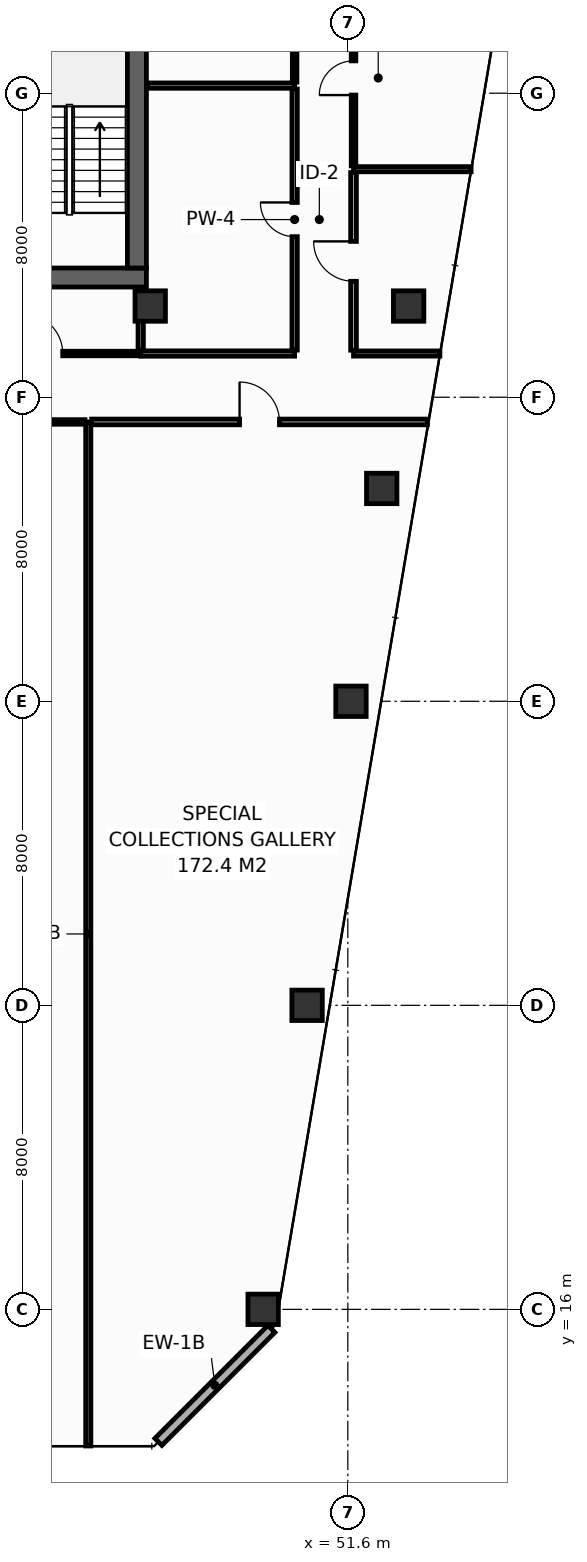
"""IFC4 building model, lengths in metres.
Left out: names, types, materials, properties, quantities, classifications, styles, units other than length and angle.
Written with IfcOpenShell. Run it as: python <this file> out.ifc"""

import sys

from ifc_helpers import new_model, si_unit, direction, frame, frame_2d, origin, origin_2d, place, context, subcontext, project, spatial, rectangle, hollow_rectangle, extrude, element, fill, save


model = new_model("IFC4")
c1 = context("Model", 3, precision=1e-05, world=origin(), true_north=direction((0.0, 1.0)))
c2 = subcontext(c1, "Body", "Model", "MODEL_VIEW")
j1 = project(units=[si_unit("LENGTHUNIT", "METRE"), si_unit("PLANEANGLEUNIT", "RADIAN")], contexts=[c1])
p1 = place(None, origin())
s1 = spatial("IfcSite", under=j1, at=p1, CompositionType="ELEMENT")
p2 = place(p1, origin())
s2 = spatial("IfcBuilding", under=s1, at=p2, CompositionType="ELEMENT")
p3 = place(p2, frame((0.0, 0.0, 198.0)))
s3 = spatial("IfcBuildingStorey", under=s2, at=p3, CompositionType="ELEMENT", Elevation=198.0)
p4 = place(p3, frame((13.6, 43.15, 0.0), z_axis=(0.0, 0.0, 1.0), x_axis=(1.0, 0.0, 0.0)))
e1 = element("IfcWall", 1, at=p4, inside=s3, PredefinedType="SHEAR", context=c2, shape_type="SweptSolid", body=[
    extrude(rectangle(XDim=32.7, YDim=0.5, at=frame_2d((16.35, 0.0))), origin(), (0.0, 0.0, 1.0), 3.55),
])
p5 = place(p4, frame((5.4, 0.0, 0.0)))
e2 = element("IfcOpeningElement", 2, at=p5, cuts=e1, PredefinedType="OPENING", context=c2, shape_type="SweptSolid", body=[
    extrude(rectangle(XDim=1.1, YDim=2.15, at=frame_2d((0.55, 1.075))), frame((0.0, 0.26, 0.0), z_axis=(0.0, -1.0, 0.0), x_axis=(1.0, 0.0, 0.0)), (0.0, 0.0, 1.0), 0.52),
])
p6 = place(p4, frame((25.6, 0.0, 0.0)))
e3 = element("IfcOpeningElement", 3, at=p6, cuts=e1, PredefinedType="OPENING", context=c2, shape_type="SweptSolid", body=[
    extrude(rectangle(XDim=1.1, YDim=2.15, at=frame_2d((0.55, 1.075))), frame((0.0, 0.26, 0.0), z_axis=(0.0, -1.0, 0.0), x_axis=(1.0, 0.0, 0.0)), (0.0, 0.0, 1.0), 0.52),
])
p7 = place(p3, frame((46.05, 43.4, 0.0), z_axis=(0.0, 0.0, 1.0), x_axis=(0.0, 1.0, 0.0)))
e4 = element("IfcWall", 4, at=p7, inside=s3, PredefinedType="SHEAR", context=c2, shape_type="SweptSolid", body=[
    extrude(rectangle(XDim=10.4, YDim=0.5, at=frame_2d((5.2, 0.0))), origin(), (0.0, 0.0, 1.0), 3.55),
])
for number, where, z_axis, x_axis in (
    (5, (46.4, 42.4, 0.0), (0.0, 0.0, 1.0), (1.0, 0.0, 0.0)),
    (6, (53.2, 42.4, 0.0), (0.0, 0.0, 1.0), (1.0, 0.0, 0.0)),
    (7, (49.372, 16.0, 0.0), (0.0, 0.0, 1.0), (1.0, 0.0, 0.0)),
    (8, (50.528, 24.0, 0.0), (0.0, 0.0, 1.0), (1.0, 0.0, 0.0)),
    (9, (51.683, 32.0, 0.0), (0.0, 0.0, 1.0), (1.0, 0.0, 0.0)),
    (10, (52.492, 37.6, 0.0), (0.0, 0.0, 1.0), (1.0, 0.0, 0.0)),
):
    element("IfcColumn", number, at=place(p3, frame(where, z_axis=z_axis, x_axis=x_axis)), inside=s3, PredefinedType="COLUMN", context=c2, shape_type="SweptSolid", body=[
        extrude(hollow_rectangle(XDim=0.8, YDim=0.8, WallThickness=0.036, at=origin_2d()), origin(), (0.0, 0.0, 1.0), 3.8),
    ])
p8 = place(p3, frame((46.615, 12.513, 0.0), z_axis=(0.0, 0.0, 1.0), x_axis=(0.707135806771, 0.70707775441, 0.0)))
e11 = element("IfcWall", 11, at=p8, inside=s3, PredefinedType="STANDARD", context=c2, shape_type="SweptSolid", body=[
    extrude(rectangle(XDim=4.206, YDim=0.26, at=frame_2d((2.103, 0.0))), origin(), (0.0, 0.0, 1.0), 3.55),
])
p9 = place(p3, frame((46.15, 41.15, 0.0), z_axis=(0.0, 0.0, 1.0), x_axis=(1.0, 0.0, 0.0)))
e12 = element("IfcWall", 12, at=p9, inside=s3, PredefinedType="PARTITIONING", context=c2, shape_type="SweptSolid", body=[
    extrude(rectangle(XDim=4.05, YDim=0.14, at=frame_2d((2.025, 0.0))), origin(), (0.0, 0.0, 1.0), 3.55),
])
p10 = place(p3, frame((46.15, 41.24, 0.0), z_axis=(0.0, 0.0, 1.0), x_axis=(0.0, 1.0, 0.0)))
e13 = element("IfcWall", 13, at=p10, inside=s3, PredefinedType="PARTITIONING", context=c2, shape_type="SweptSolid", body=[
    extrude(rectangle(XDim=1.64, YDim=0.14, at=frame_2d((0.82, 0.0))), origin(), (0.0, 0.0, 1.0), 3.55),
])
p11 = place(p3, frame((46.32, 48.2, 0.0), z_axis=(0.0, 0.0, 1.0), x_axis=(1.0, 0.0, 0.0)))
e14 = element("IfcWall", 14, at=p11, inside=s3, PredefinedType="PARTITIONING", context=c2, shape_type="SweptSolid", body=[
    extrude(rectangle(XDim=3.88, YDim=0.14, at=frame_2d((1.94, 0.0))), origin(), (0.0, 0.0, 1.0), 3.55),
])
p12 = place(p3, frame((50.2, 41.24, 0.0), z_axis=(0.0, 0.0, 1.0), x_axis=(0.0, 1.0, 0.0)))
e15 = element("IfcWall", 15, at=p12, inside=s3, PredefinedType="PARTITIONING", context=c2, shape_type="SweptSolid", body=[
    extrude(rectangle(XDim=6.87, YDim=0.14, at=frame_2d((3.435, 0.0))), origin(), (0.0, 0.0, 1.0), 2.835),
])
p13 = place(p12, frame((2.985, 0.0, 0.0)))
e16 = element("IfcOpeningElement", 16, at=p13, cuts=e15, PredefinedType="OPENING", context=c2, shape_type="SweptSolid", body=[
    extrude(rectangle(XDim=0.9, YDim=2.1, at=frame_2d((0.45, 1.05))), frame((0.0, 0.08, 0.0), z_axis=(0.0, -1.0, 0.0), x_axis=(1.0, 0.0, 0.0)), (0.0, 0.0, 1.0), 0.16),
])
p14 = place(p3, frame((50.2, 48.29, 0.0), z_axis=(0.0, 0.0, 1.0), x_axis=(0.0, 1.0, 0.0)))
e17 = element("IfcWall", 17, at=p14, inside=s3, PredefinedType="PARTITIONING", context=c2, shape_type="SweptSolid", body=[
    extrude(rectangle(XDim=3.98, YDim=0.12, at=frame_2d((1.99, 0.0))), origin(), (0.0, 0.0, 1.0), 3.55),
])
p15 = place(p14, frame((1.465, 0.0, 0.0)))
e18 = element("IfcOpeningElement", 18, at=p15, cuts=e17, PredefinedType="OPENING", context=c2, shape_type="SweptSolid", body=[
    extrude(rectangle(XDim=1.05, YDim=2.15, at=frame_2d((0.525, 1.075))), frame((0.0, 0.07, 0.0), z_axis=(0.0, -1.0, 0.0), x_axis=(1.0, 0.0, 0.0)), (0.0, 0.0, 1.0), 0.14),
])
p16 = place(p3, frame((51.75, 41.15, 0.0), z_axis=(0.0, 0.0, 1.0), x_axis=(1.0, 0.0, 0.0)))
e19 = element("IfcWall", 19, at=p16, inside=s3, PredefinedType="PARTITIONING", context=c2, shape_type="SweptSolid", body=[
    extrude(rectangle(XDim=2.273, YDim=0.135, at=frame_2d((1.136, 0.0))), origin(), (0.0, 0.0, 1.0), 3.035),
])
p17 = place(p3, frame((51.75, 46.0, 0.0), z_axis=(0.0, 0.0, 1.0), x_axis=(1.0, 0.0, 0.0)))
e20 = element("IfcWall", 20, at=p17, inside=s3, PredefinedType="PARTITIONING", context=c2, shape_type="SweptSolid", body=[
    extrude(rectangle(XDim=3.094, YDim=0.135, at=frame_2d((1.547, 0.0))), origin(), (0.0, 0.0, 1.0), 2.835),
])
p18 = place(p3, frame((51.75, 41.238, 0.0), z_axis=(0.0, 0.0, 1.0), x_axis=(0.0, 1.0, 0.0)))
e21 = element("IfcWall", 21, at=p18, inside=s3, PredefinedType="PARTITIONING", context=c2, shape_type="SweptSolid", body=[
    extrude(rectangle(XDim=4.675, YDim=0.15, at=frame_2d((2.337, 0.0))), origin(), (0.0, 0.0, 1.0), 2.835),
])
p19 = place(p18, frame((1.813, 0.0, 0.0)))
e22 = element("IfcOpeningElement", 22, at=p19, cuts=e21, PredefinedType="OPENING", context=c2, shape_type="SweptSolid", body=[
    extrude(rectangle(XDim=1.05, YDim=2.15, at=frame_2d((0.525, 1.075))), frame((0.0, 0.085, 0.0), z_axis=(0.0, -1.0, 0.0), x_axis=(1.0, 0.0, 0.0)), (0.0, 0.0, 1.0), 0.17),
])
p20 = place(p3, frame((51.75, 46.087, 0.0), z_axis=(0.0, 0.0, 1.0), x_axis=(0.0, 1.0, 0.0)))
e23 = element("IfcWall", 23, at=p20, inside=s3, PredefinedType="PARTITIONING", context=c2, shape_type="SweptSolid", body=[
    extrude(rectangle(XDim=4.625, YDim=0.12, at=frame_2d((2.312, 0.0))), origin(), (0.0, 0.0, 1.0), 3.55),
])
p21 = place(p20, frame((1.863, 0.0, 0.0)))
e24 = element("IfcOpeningElement", 24, at=p21, cuts=e23, PredefinedType="OPENING", context=c2, shape_type="SweptSolid", body=[
    extrude(rectangle(XDim=0.9, YDim=2.1, at=frame_2d((0.45, 1.05))), frame((0.0, 0.07, 0.0), z_axis=(0.0, -1.0, 0.0), x_axis=(1.0, 0.0, 0.0)), (0.0, 0.0, 1.0), 0.14),
])
p22 = place(p3, frame((40.995, 41.15, 0.0), z_axis=(0.0, 0.0, 1.0), x_axis=(1.0, 0.0, 0.0)))
e25 = element("IfcWall", 25, at=p22, inside=s3, PredefinedType="PARTITIONING", context=c2, shape_type="SweptSolid", body=[
    extrude(rectangle(XDim=5.155, YDim=0.12, at=frame_2d((2.577, 0.0))), origin(), (0.0, 0.0, 1.0), 3.55),
])
p23 = place(p22, frame((2.053, 0.0, 0.0)))
e26 = element("IfcOpeningElement", 26, at=p23, cuts=e25, PredefinedType="OPENING", context=c2, shape_type="SweptSolid", body=[
    extrude(rectangle(XDim=1.05, YDim=2.15, at=frame_2d((0.525, 1.075))), frame((0.0, 0.07, 0.0), z_axis=(0.0, -1.0, 0.0), x_axis=(1.0, 0.0, 0.0)), (0.0, 0.0, 1.0), 0.14),
])
p24 = place(p3, frame((44.77, 12.405, 0.0), z_axis=(0.0, 0.0, 1.0), x_axis=(0.0, 1.0, 0.0)))
e27 = element("IfcWall", 27, at=p24, inside=s3, PredefinedType="PARTITIONING", context=c2, shape_type="SweptSolid", body=[
    extrude(rectangle(XDim=26.945, YDim=0.135, at=frame_2d((13.473, 0.0))), origin(), (0.0, 0.0, 1.0), 2.835),
])
p25 = place(p3, frame((36.23, 39.35, 0.0), z_axis=(0.0, 0.0, 1.0), x_axis=(1.0, 0.0, 0.0)))
e28 = element("IfcWall", 28, at=p25, inside=s3, PredefinedType="PARTITIONING", context=c2, shape_type="SweptSolid", body=[
    extrude(rectangle(XDim=8.453, YDim=0.12, at=frame_2d((4.226, 0.0))), origin(), (0.0, 0.0, 1.0), 2.835),
])
p26 = place(p25, frame((3.701, 0.0, 0.0)))
e29 = element("IfcOpeningElement", 29, at=p26, cuts=e28, PredefinedType="OPENING", context=c2, shape_type="SweptSolid", body=[
    extrude(rectangle(XDim=1.05, YDim=2.15, at=frame_2d((0.525, 1.075))), frame((0.0, 0.07, 0.0), z_axis=(0.0, -1.0, 0.0), x_axis=(1.0, 0.0, 0.0)), (0.0, 0.0, 1.0), 0.14),
])
p27 = place(p3, frame((44.857, 39.35, 0.0), z_axis=(0.0, 0.0, 1.0), x_axis=(1.0, 0.0, 0.0)))
e30 = element("IfcWall", 30, at=p27, inside=s3, PredefinedType="PARTITIONING", context=c2, shape_type="SweptSolid", body=[
    extrude(rectangle(XDim=8.838, YDim=0.15, at=frame_2d((4.419, 0.0))), origin(), (0.0, 0.0, 1.0), 3.035),
])
p28 = place(p27, frame((3.894, 0.0, 0.0)))
e31 = element("IfcOpeningElement", 31, at=p28, cuts=e30, PredefinedType="OPENING", context=c2, shape_type="SweptSolid", body=[
    extrude(rectangle(XDim=1.05, YDim=2.15, at=frame_2d((0.525, 1.075))), frame((0.0, 0.085, 0.0), z_axis=(0.0, -1.0, 0.0), x_axis=(1.0, 0.0, 0.0)), (0.0, 0.0, 1.0), 0.17),
])
p29 = place(p13, origin())
e32 = element("IfcDoor", 32, at=p29, inside=s3, OperationType="SINGLE_SWING_RIGHT", PredefinedType="DOOR", context=c2, shape_type="SweptSolid", body=[
    extrude(rectangle(XDim=0.9, YDim=2.1, at=frame_2d((0.45, 1.05))), frame((0.0, 0.025, 0.0), z_axis=(0.0, -1.0, 0.0), x_axis=(1.0, 0.0, 0.0)), (0.0, 0.0, 1.0), 0.05),
])
fill(e16, e32)
p30 = place(p19, origin())
e33 = element("IfcDoor", 33, at=p30, inside=s3, OperationType="SINGLE_SWING_RIGHT", PredefinedType="DOOR", context=c2, shape_type="SweptSolid", body=[
    extrude(rectangle(XDim=1.05, YDim=2.15, at=frame_2d((0.525, 1.075))), frame((0.0, 0.025, 0.0), z_axis=(0.0, -1.0, 0.0), x_axis=(1.0, 0.0, 0.0)), (0.0, 0.0, 1.0), 0.05),
])
fill(e22, e33)
p31 = place(p21, origin())
e34 = element("IfcDoor", 34, at=p31, inside=s3, OperationType="SINGLE_SWING_LEFT", PredefinedType="DOOR", context=c2, shape_type="SweptSolid", body=[
    extrude(rectangle(XDim=0.9, YDim=2.1, at=frame_2d((0.45, 1.05))), frame((0.0, 0.025, 0.0), z_axis=(0.0, -1.0, 0.0), x_axis=(1.0, 0.0, 0.0)), (0.0, 0.0, 1.0), 0.05),
])
fill(e24, e34)
p32 = place(p23, origin())
e35 = element("IfcDoor", 35, at=p32, inside=s3, OperationType="SINGLE_SWING_LEFT", PredefinedType="DOOR", context=c2, shape_type="SweptSolid", body=[
    extrude(rectangle(XDim=1.05, YDim=2.15, at=frame_2d((0.525, 1.075))), frame((0.0, 0.025, 0.0), z_axis=(0.0, -1.0, 0.0), x_axis=(1.0, 0.0, 0.0)), (0.0, 0.0, 1.0), 0.05),
])
fill(e26, e35)
p33 = place(p28, origin())
e36 = element("IfcDoor", 36, at=p33, inside=s3, OperationType="SINGLE_SWING_LEFT", PredefinedType="DOOR", context=c2, shape_type="SweptSolid", body=[
    extrude(rectangle(XDim=1.05, YDim=2.15, at=frame_2d((0.525, 1.075))), frame((0.0, 0.025, 0.0), z_axis=(0.0, -1.0, 0.0), x_axis=(1.0, 0.0, 0.0)), (0.0, 0.0, 1.0), 0.05),
])
fill(e31, e36)
save(model, sys.argv[1])
